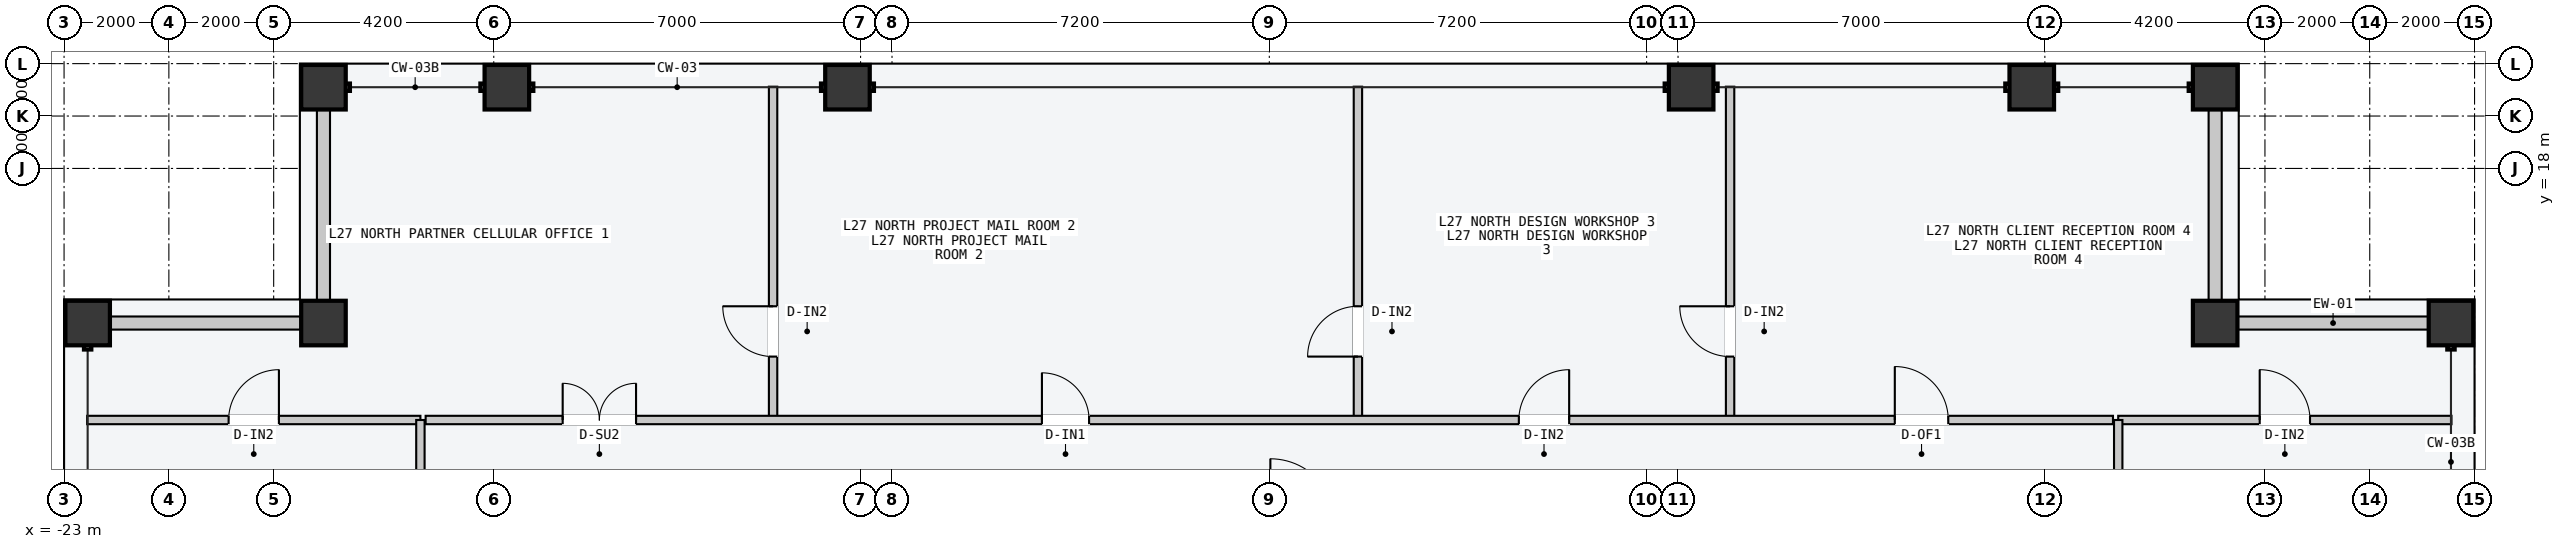
"""IFC4 building model, lengths in metres.
Left out: names, types, materials, properties, quantities, classifications, styles, units other than length and angle.
Written with IfcOpenShell. Run it as: python <this file> out.ifc"""

import sys

from ifc_helpers import new_model, si_unit, direction, frame, frame_2d, origin, origin_2d, place, context, subcontext, project, spatial, rectangle, hollow_rectangle, extrude, element, fill, save


model = new_model("IFC4")
c1 = context("Model", 3, precision=1e-05, world=origin(), true_north=direction((0.0, 1.0)))
c2 = subcontext(c1, "Body", "Model", "MODEL_VIEW")
j1 = project(units=[si_unit("LENGTHUNIT", "METRE"), si_unit("PLANEANGLEUNIT", "RADIAN")], contexts=[c1])
p1 = place(None, origin())
s1 = spatial("IfcSite", under=j1, at=p1, CompositionType="ELEMENT")
p2 = place(p1, origin())
s2 = spatial("IfcBuilding", under=s1, at=p2, CompositionType="ELEMENT")
p3 = place(p2, frame((0.0, 0.0, 106.2)))
s3 = spatial("IfcBuildingStorey", under=s2, at=p3, CompositionType="ELEMENT", Elevation=106.2)
for number, where, z_axis, x_axis in (
    (1, (-18.05, 19.55, 0.0), (0.0, 0.0, 1.0), (1.0, 0.0, 0.0)),
    (2, (-14.55, 19.55, 0.0), (0.0, 0.0, 1.0), (1.0, 0.0, 0.0)),
    (3, (-8.05, 19.55, 0.0), (0.0, 0.0, 1.0), (1.0, 0.0, 0.0)),
    (4, (8.05, 19.55, 0.0), (0.0, 0.0, 1.0), (1.0, 0.0, 0.0)),
    (5, (14.55, 19.55, 0.0), (0.0, 0.0, 1.0), (1.0, 0.0, 0.0)),
    (6, (18.05, 19.55, 0.0), (0.0, 0.0, 1.0), (1.0, 0.0, 0.0)),
    (7, (-22.55, 15.05, 0.0), (0.0, 0.0, 1.0), (0.0, 1.0, 0.0)),
    (8, (22.55, 15.05, 0.0), (0.0, 0.0, 1.0), (0.0, 1.0, 0.0)),
    (9, (-18.05, 15.05, 0.0), (0.0, 0.0, 1.0), (1.0, 0.0, 0.0)),
    (10, (18.05, 15.05, 0.0), (0.0, 0.0, 1.0), (1.0, 0.0, 0.0)),
):
    element("IfcColumn", number, at=place(p3, frame(where, z_axis=z_axis, x_axis=x_axis)), inside=s3, PredefinedType="COLUMN", context=c2, shape_type="SweptSolid", body=[
        extrude(hollow_rectangle(XDim=0.85, YDim=0.85, WallThickness=0.04, at=origin_2d()), origin(), (0.0, 0.0, 1.0), 3.6),
    ])
for number, where, z_axis, x_axis in (
    (11, (-22.115, 15.05, 0.0), (0.0, 0.0, 1.0), (1.0, 0.0, 0.0)),
    (12, (-18.05, 15.485, 0.0), (0.0, 0.0, 1.0), (0.0, 1.0, 0.0)),
    (13, (18.485, 15.05, 0.0), (0.0, 0.0, 1.0), (1.0, 0.0, 0.0)),
    (14, (18.05, 15.485, 0.0), (0.0, 0.0, 1.0), (0.0, 1.0, 0.0)),
):
    element("IfcWall", number, at=place(p3, frame(where, z_axis=z_axis, x_axis=x_axis)), inside=s3, PredefinedType="STANDARD", context=c2, shape_type="SweptSolid", body=[
        extrude(rectangle(XDim=3.63, YDim=0.25, at=frame_2d((1.815, 0.0))), origin(), (0.0, 0.0, 1.0), 2.75),
    ])
p4 = place(p3, frame((-9.469, 13.26, 0.0), z_axis=(0.0, 0.0, 1.0), x_axis=(0.0, 1.0, 0.0)))
e15 = element("IfcWall", 15, at=p4, inside=s3, PredefinedType="PARTITIONING", context=c2, shape_type="SweptSolid", body=[
    extrude(rectangle(XDim=6.3, YDim=0.16, at=frame_2d((3.15, 0.0))), origin(), (0.0, 0.0, 1.0), 3.4),
])
p5 = place(p4, frame((1.15, 0.0, 0.0)))
e16 = element("IfcOpeningElement", 16, at=p5, cuts=e15, PredefinedType="OPENING", context=c2, shape_type="SweptSolid", body=[
    extrude(rectangle(XDim=0.96, YDim=2.18, at=frame_2d((0.48, 1.09))), frame((0.0, 0.09, 0.0), z_axis=(0.0, -1.0, 0.0), x_axis=(1.0, 0.0, 0.0)), (0.0, 0.0, 1.0), 0.18),
])
p6 = place(p3, frame((1.691, 13.26, 0.0), z_axis=(0.0, 0.0, 1.0), x_axis=(0.0, 1.0, 0.0)))
e17 = element("IfcWall", 17, at=p6, inside=s3, PredefinedType="PARTITIONING", context=c2, shape_type="SweptSolid", body=[
    extrude(rectangle(XDim=6.3, YDim=0.16, at=frame_2d((3.15, 0.0))), origin(), (0.0, 0.0, 1.0), 3.4),
])
p7 = place(p6, frame((1.15, 0.0, 0.0)))
e18 = element("IfcOpeningElement", 18, at=p7, cuts=e17, PredefinedType="OPENING", context=c2, shape_type="SweptSolid", body=[
    extrude(rectangle(XDim=0.96, YDim=2.18, at=frame_2d((0.48, 1.09))), frame((0.0, 0.09, 0.0), z_axis=(0.0, -1.0, 0.0), x_axis=(1.0, 0.0, 0.0)), (0.0, 0.0, 1.0), 0.18),
])
p8 = place(p3, frame((8.793, 13.26, 0.0), z_axis=(0.0, 0.0, 1.0), x_axis=(0.0, 1.0, 0.0)))
e19 = element("IfcWall", 19, at=p8, inside=s3, PredefinedType="PARTITIONING", context=c2, shape_type="SweptSolid", body=[
    extrude(rectangle(XDim=6.3, YDim=0.16, at=frame_2d((3.15, 0.0))), origin(), (0.0, 0.0, 1.0), 3.4),
])
p9 = place(p8, frame((1.15, 0.0, 0.0)))
e20 = element("IfcOpeningElement", 20, at=p9, cuts=e19, PredefinedType="OPENING", context=c2, shape_type="SweptSolid", body=[
    extrude(rectangle(XDim=0.96, YDim=2.18, at=frame_2d((0.48, 1.09))), frame((0.0, 0.09, 0.0), z_axis=(0.0, -1.0, 0.0), x_axis=(1.0, 0.0, 0.0)), (0.0, 0.0, 1.0), 0.18),
])
p10 = place(p3, frame((-16.1, 13.2, 0.0), z_axis=(0.0, 0.0, 1.0), x_axis=(1.0, 0.0, 0.0)))
e21 = element("IfcWall", 21, at=p10, inside=s3, PredefinedType="PARTITIONING", context=c2, shape_type="SweptSolid", body=[
    extrude(rectangle(XDim=32.2, YDim=0.16, at=frame_2d((16.1, 0.0))), origin(), (0.0, 0.0, 1.0), 3.4),
])
p11 = place(p10, frame((2.615, 0.0, 0.0)))
e22 = element("IfcOpeningElement", 22, at=p11, cuts=e21, PredefinedType="OPENING", context=c2, shape_type="SweptSolid", body=[
    extrude(rectangle(XDim=1.4, YDim=2.2, at=frame_2d((0.7, 1.1))), frame((0.0, 0.09, 0.0), z_axis=(0.0, -1.0, 0.0), x_axis=(1.0, 0.0, 0.0)), (0.0, 0.0, 1.0), 0.18),
])
p12 = place(p10, frame((11.761, 0.0, 0.0)))
e23 = element("IfcOpeningElement", 23, at=p12, cuts=e21, PredefinedType="OPENING", context=c2, shape_type="SweptSolid", body=[
    extrude(rectangle(XDim=0.9, YDim=2.15, at=frame_2d((0.45, 1.075))), frame((0.0, 0.09, 0.0), z_axis=(0.0, -1.0, 0.0), x_axis=(1.0, 0.0, 0.0)), (0.0, 0.0, 1.0), 0.18),
])
p13 = place(p10, frame((20.862, 0.0, 0.0)))
e24 = element("IfcOpeningElement", 24, at=p13, cuts=e21, PredefinedType="OPENING", context=c2, shape_type="SweptSolid", body=[
    extrude(rectangle(XDim=0.96, YDim=2.18, at=frame_2d((0.48, 1.09))), frame((0.0, 0.09, 0.0), z_axis=(0.0, -1.0, 0.0), x_axis=(1.0, 0.0, 0.0)), (0.0, 0.0, 1.0), 0.18),
])
p14 = place(p10, frame((28.037, 0.0, 0.0)))
e25 = element("IfcOpeningElement", 25, at=p14, cuts=e21, PredefinedType="OPENING", context=c2, shape_type="SweptSolid", body=[
    extrude(rectangle(XDim=1.02, YDim=2.2, at=frame_2d((0.51, 1.1))), frame((0.0, 0.09, 0.0), z_axis=(0.0, -1.0, 0.0), x_axis=(1.0, 0.0, 0.0)), (0.0, 0.0, 1.0), 0.18),
])
p15 = place(p3, frame((-22.56, 13.2, 0.0), z_axis=(0.0, 0.0, 1.0), x_axis=(1.0, 0.0, 0.0)))
e26 = element("IfcWall", 26, at=p15, inside=s3, PredefinedType="PARTITIONING", context=c2, shape_type="SweptSolid", body=[
    extrude(rectangle(XDim=6.36, YDim=0.16, at=frame_2d((3.18, 0.0))), origin(), (0.0, 0.0, 1.0), 3.4),
])
p16 = place(p15, frame((2.7, 0.0, 0.0)))
e27 = element("IfcOpeningElement", 27, at=p16, cuts=e26, PredefinedType="OPENING", context=c2, shape_type="SweptSolid", body=[
    extrude(rectangle(XDim=0.96, YDim=2.18, at=frame_2d((0.48, 1.09))), frame((0.0, 0.09, 0.0), z_axis=(0.0, -1.0, 0.0), x_axis=(1.0, 0.0, 0.0)), (0.0, 0.0, 1.0), 0.18),
])
p17 = place(p3, frame((16.2, 13.2, 0.0), z_axis=(0.0, 0.0, 1.0), x_axis=(1.0, 0.0, 0.0)))
e28 = element("IfcWall", 28, at=p17, inside=s3, PredefinedType="PARTITIONING", context=c2, shape_type="SweptSolid", body=[
    extrude(rectangle(XDim=6.36, YDim=0.16, at=frame_2d((3.18, 0.0))), origin(), (0.0, 0.0, 1.0), 3.4),
])
p18 = place(p17, frame((2.7, 0.0, 0.0)))
e29 = element("IfcOpeningElement", 29, at=p18, cuts=e28, PredefinedType="OPENING", context=c2, shape_type="SweptSolid", body=[
    extrude(rectangle(XDim=0.96, YDim=2.18, at=frame_2d((0.48, 1.09))), frame((0.0, 0.09, 0.0), z_axis=(0.0, -1.0, 0.0), x_axis=(1.0, 0.0, 0.0)), (0.0, 0.0, 1.0), 0.18),
])
for number, where, z_axis, x_axis in (
    (30, (-16.2, 11.25, 0.0), (0.0, 0.0, 1.0), (0.0, 1.0, 0.0)),
    (31, (16.2, 11.25, 0.0), (0.0, 0.0, 1.0), (0.0, 1.0, 0.0)),
):
    element("IfcWall", number, at=place(p3, frame(where, z_axis=z_axis, x_axis=x_axis)), inside=s3, PredefinedType="PARTITIONING", context=c2, shape_type="SweptSolid", body=[
        extrude(rectangle(XDim=1.95, YDim=0.16, at=frame_2d((0.975, 0.0))), origin(), (0.0, 0.0, 1.0), 3.4),
    ])
p19 = place(p5, origin())
e32 = element("IfcDoor", 32, at=p19, inside=s3, OperationType="SINGLE_SWING_RIGHT", PredefinedType="DOOR", context=c2, shape_type="SweptSolid", body=[
    extrude(rectangle(XDim=0.96, YDim=2.18, at=frame_2d((0.48, 1.09))), frame((0.0, 0.025, 0.0), z_axis=(0.0, -1.0, 0.0), x_axis=(1.0, 0.0, 0.0)), (0.0, 0.0, 1.0), 0.05),
])
fill(e16, e32)
p20 = place(p7, origin())
e33 = element("IfcDoor", 33, at=p20, inside=s3, OperationType="SINGLE_SWING_LEFT", PredefinedType="DOOR", context=c2, shape_type="SweptSolid", body=[
    extrude(rectangle(XDim=0.96, YDim=2.18, at=frame_2d((0.48, 1.09))), frame((0.0, 0.025, 0.0), z_axis=(0.0, -1.0, 0.0), x_axis=(1.0, 0.0, 0.0)), (0.0, 0.0, 1.0), 0.05),
])
fill(e18, e33)
p21 = place(p9, origin())
e34 = element("IfcDoor", 34, at=p21, inside=s3, OperationType="SINGLE_SWING_RIGHT", PredefinedType="DOOR", context=c2, shape_type="SweptSolid", body=[
    extrude(rectangle(XDim=0.96, YDim=2.18, at=frame_2d((0.48, 1.09))), frame((0.0, 0.025, 0.0), z_axis=(0.0, -1.0, 0.0), x_axis=(1.0, 0.0, 0.0)), (0.0, 0.0, 1.0), 0.05),
])
fill(e20, e34)
p22 = place(p11, origin())
e35 = element("IfcDoor", 35, at=p22, inside=s3, OperationType="DOUBLE_DOOR_SINGLE_SWING", PredefinedType="DOOR", context=c2, shape_type="SweptSolid", body=[
    extrude(rectangle(XDim=1.4, YDim=2.2, at=frame_2d((0.7, 1.1))), frame((0.0, 0.025, 0.0), z_axis=(0.0, -1.0, 0.0), x_axis=(1.0, 0.0, 0.0)), (0.0, 0.0, 1.0), 0.05),
])
fill(e22, e35)
p23 = place(p12, origin())
e36 = element("IfcDoor", 36, at=p23, inside=s3, OperationType="SINGLE_SWING_LEFT", PredefinedType="DOOR", context=c2, shape_type="SweptSolid", body=[
    extrude(rectangle(XDim=0.9, YDim=2.15, at=frame_2d((0.45, 1.075))), frame((0.0, 0.025, 0.0), z_axis=(0.0, -1.0, 0.0), x_axis=(1.0, 0.0, 0.0)), (0.0, 0.0, 1.0), 0.05),
])
fill(e23, e36)
p24 = place(p13, origin())
e37 = element("IfcDoor", 37, at=p24, inside=s3, OperationType="SINGLE_SWING_RIGHT", PredefinedType="DOOR", context=c2, shape_type="SweptSolid", body=[
    extrude(rectangle(XDim=0.96, YDim=2.18, at=frame_2d((0.48, 1.09))), frame((0.0, 0.025, 0.0), z_axis=(0.0, -1.0, 0.0), x_axis=(1.0, 0.0, 0.0)), (0.0, 0.0, 1.0), 0.05),
])
fill(e24, e37)
p25 = place(p14, origin())
e38 = element("IfcDoor", 38, at=p25, inside=s3, OperationType="SINGLE_SWING_LEFT", PredefinedType="DOOR", context=c2, shape_type="SweptSolid", body=[
    extrude(rectangle(XDim=1.02, YDim=2.2, at=frame_2d((0.51, 1.1))), frame((0.0, 0.025, 0.0), z_axis=(0.0, -1.0, 0.0), x_axis=(1.0, 0.0, 0.0)), (0.0, 0.0, 1.0), 0.05),
])
fill(e25, e38)
p26 = place(p16, origin())
e39 = element("IfcDoor", 39, at=p26, inside=s3, OperationType="SINGLE_SWING_RIGHT", PredefinedType="DOOR", context=c2, shape_type="SweptSolid", body=[
    extrude(rectangle(XDim=0.96, YDim=2.18, at=frame_2d((0.48, 1.09))), frame((0.0, 0.025, 0.0), z_axis=(0.0, -1.0, 0.0), x_axis=(1.0, 0.0, 0.0)), (0.0, 0.0, 1.0), 0.05),
])
fill(e27, e39)
p27 = place(p18, origin())
e40 = element("IfcDoor", 40, at=p27, inside=s3, OperationType="SINGLE_SWING_LEFT", PredefinedType="DOOR", context=c2, shape_type="SweptSolid", body=[
    extrude(rectangle(XDim=0.96, YDim=2.18, at=frame_2d((0.48, 1.09))), frame((0.0, 0.025, 0.0), z_axis=(0.0, -1.0, 0.0), x_axis=(1.0, 0.0, 0.0)), (0.0, 0.0, 1.0), 0.05),
])
fill(e29, e40)
save(model, sys.argv[1])
